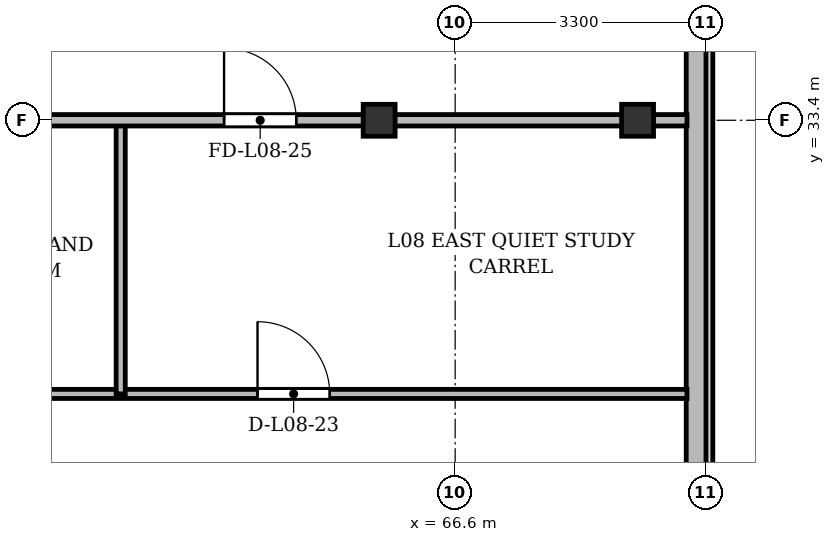
"""IFC4 building model, lengths in metres.
Left out: names, types, materials, properties, quantities, classifications, styles, units other than length and angle.
Written with IfcOpenShell. Run it as: python <this file> out.ifc"""

import sys

from ifc_helpers import new_model, si_unit, direction, frame, frame_2d, origin, origin_2d, place, context, subcontext, project, spatial, rectangle, i_section, extrude, source, transform, mapped, element, fill, save


model = new_model("IFC4")
c1 = context("Model", 3, precision=1e-05, world=origin(), true_north=direction((0.0, 1.0)))
c2 = subcontext(c1, "Body", "Model", "MODEL_VIEW")
j1 = project(units=[si_unit("LENGTHUNIT", "METRE"), si_unit("PLANEANGLEUNIT", "RADIAN")], contexts=[c1])
p1 = place(None, origin())
s1 = spatial("IfcSite", under=j1, at=p1, CompositionType="ELEMENT")
p2 = place(p1, origin())
s2 = spatial("IfcBuilding", under=s1, at=p2, CompositionType="ELEMENT")
p3 = place(p2, frame((0.0, 0.0, 34.3)))
s3 = spatial("IfcBuildingStorey", under=s2, at=p3, CompositionType="ELEMENT", Elevation=34.3)
m1 = source(origin(), c2, "Body", "SweptSolid", [
    extrude(i_section(OverallWidth=0.42, OverallDepth=0.42, WebThickness=0.026, FlangeThickness=0.04, at=origin_2d()), origin(), (0.0, 0.0, 1.0), 3.6),
])
for number, where, z_axis, x_axis in (
    (1, (65.6, 33.4, 0.0), (0.0, 0.0, 1.0), (1.0, 0.0, 0.0)),
    (2, (69.0, 33.4, 0.0), (0.0, 0.0, 1.0), (1.0, 0.0, 0.0)),
):
    element("IfcColumn", number, at=place(p3, frame(where, z_axis=z_axis, x_axis=x_axis)), inside=s3, PredefinedType="COLUMN", context=c2, shape_type="MappedRepresentation", body=[
        mapped(m1, transform((0.0, 0.0, 0.0), x_axis=(1.0, 0.0, 0.0), y_axis=(0.0, 1.0, 0.0), z_axis=(0.0, 0.0, 1.0), scale=1.0)),
    ])
p4 = place(p3, frame((69.77, 45.5, 0.0), z_axis=(0.0, 0.0, 1.0), x_axis=(0.0, -1.0, 0.0)))
e3 = element("IfcWall", 3, at=p4, inside=s3, PredefinedType="SOLIDWALL", context=c2, shape_type="SweptSolid", body=[
    extrude(rectangle(XDim=39.6, YDim=0.26, at=frame_2d((19.8, 0.0))), origin(), (0.0, 0.0, 1.0), 3.34),
])
p5 = place(p4, frame((36.95, 0.0, 0.92)))
e4 = element("IfcOpeningElement", 4, at=p5, cuts=e3, PredefinedType="OPENING", context=c2, shape_type="SweptSolid", body=[
    extrude(rectangle(XDim=1.2, YDim=1.65, at=frame_2d((0.6, 0.825))), frame((0.0, 0.14, 0.0), z_axis=(0.0, -1.0, 0.0), x_axis=(1.0, 0.0, 0.0)), (0.0, 0.0, 1.0), 0.28),
])
p6 = place(p4, frame((32.8, 0.0, 0.92)))
e5 = element("IfcOpeningElement", 5, at=p6, cuts=e3, PredefinedType="OPENING", context=c2, shape_type="SweptSolid", body=[
    extrude(rectangle(XDim=2.6, YDim=1.9, at=frame_2d((1.3, 0.95))), frame((0.0, 0.14, 0.0), z_axis=(0.0, -1.0, 0.0), x_axis=(1.0, 0.0, 0.0)), (0.0, 0.0, 1.0), 0.28),
])
p7 = place(p4, frame((28.6, 0.0, 0.92)))
e6 = element("IfcOpeningElement", 6, at=p7, cuts=e3, PredefinedType="OPENING", context=c2, shape_type="SweptSolid", body=[
    extrude(rectangle(XDim=2.6, YDim=1.9, at=frame_2d((1.3, 0.95))), frame((0.0, 0.14, 0.0), z_axis=(0.0, -1.0, 0.0), x_axis=(1.0, 0.0, 0.0)), (0.0, 0.0, 1.0), 0.28),
])
p8 = place(p4, frame((7.4, 0.0, 0.92)))
e7 = element("IfcOpeningElement", 7, at=p8, cuts=e3, PredefinedType="OPENING", context=c2, shape_type="SweptSolid", body=[
    extrude(rectangle(XDim=2.6, YDim=1.9, at=frame_2d((1.3, 0.95))), frame((0.0, 0.14, 0.0), z_axis=(0.0, -1.0, 0.0), x_axis=(1.0, 0.0, 0.0)), (0.0, 0.0, 1.0), 0.28),
])
p9 = place(p4, frame((4.5, 0.0, 0.92)))
e8 = element("IfcOpeningElement", 8, at=p9, cuts=e3, PredefinedType="OPENING", context=c2, shape_type="SweptSolid", body=[
    extrude(rectangle(XDim=1.2, YDim=1.65, at=frame_2d((0.6, 0.825))), frame((0.0, 0.14, 0.0), z_axis=(0.0, -1.0, 0.0), x_axis=(1.0, 0.0, 0.0)), (0.0, 0.0, 1.0), 0.28),
])
p10 = place(p4, frame((1.15, 0.0, 0.92)))
e9 = element("IfcOpeningElement", 9, at=p10, cuts=e3, PredefinedType="OPENING", context=c2, shape_type="SweptSolid", body=[
    extrude(rectangle(XDim=1.2, YDim=1.65, at=frame_2d((0.6, 0.825))), frame((0.0, 0.14, 0.0), z_axis=(0.0, -1.0, 0.0), x_axis=(1.0, 0.0, 0.0)), (0.0, 0.0, 1.0), 0.28),
])
p11 = place(p3, frame((54.8, 29.8, 0.0), z_axis=(0.0, 0.0, 1.0), x_axis=(1.0, 0.0, 0.0)))
e10 = element("IfcWall", 10, at=p11, inside=s3, PredefinedType="PARTITIONING", context=c2, shape_type="SweptSolid", body=[
    extrude(rectangle(XDim=14.85, YDim=0.12, at=frame_2d((7.425, 0.0))), origin(), (0.0, 0.0, 1.0), 2.752),
])
p12 = place(p11, frame((2.5, 0.0, 0.0)))
e11 = element("IfcOpeningElement", 11, at=p12, cuts=e10, PredefinedType="OPENING", context=c2, shape_type="SweptSolid", body=[
    extrude(rectangle(XDim=0.95, YDim=2.15, at=frame_2d((0.475, 1.075))), frame((0.0, 0.07, 0.0), z_axis=(0.0, -1.0, 0.0), x_axis=(1.0, 0.0, 0.0)), (0.0, 0.0, 1.0), 0.14),
])
p13 = place(p11, frame((9.2, 0.0, 0.0)))
e12 = element("IfcOpeningElement", 12, at=p13, cuts=e10, PredefinedType="OPENING", context=c2, shape_type="SweptSolid", body=[
    extrude(rectangle(XDim=0.95, YDim=2.15, at=frame_2d((0.475, 1.075))), frame((0.0, 0.07, 0.0), z_axis=(0.0, -1.0, 0.0), x_axis=(1.0, 0.0, 0.0)), (0.0, 0.0, 1.0), 0.14),
])
p14 = place(p3, frame((62.2, 29.8, 0.0), z_axis=(0.0, 0.0, 1.0), x_axis=(0.0, 1.0, 0.0)))
e13 = element("IfcWall", 13, at=p14, inside=s3, PredefinedType="PARTITIONING", context=c2, shape_type="SweptSolid", body=[
    extrude(rectangle(XDim=3.6, YDim=0.12, at=frame_2d((1.8, 0.0))), origin(), (0.0, 0.0, 1.0), 2.69),
])
p15 = place(p3, frame((58.8, 33.4, 0.0), z_axis=(0.0, 0.0, 1.0), x_axis=(1.0, 0.0, 0.0)))
e14 = element("IfcWall", 14, at=p15, inside=s3, PredefinedType="PARTITIONING", context=c2, shape_type="SweptSolid", body=[
    extrude(rectangle(XDim=10.85, YDim=0.15, at=frame_2d((5.425, 0.0))), origin(), (0.0, 0.0, 1.0), 2.69),
])
p16 = place(p15, frame((4.76, 0.0, 0.0)))
e15 = element("IfcOpeningElement", 15, at=p16, cuts=e14, PredefinedType="OPENING", context=c2, shape_type="SweptSolid", body=[
    extrude(rectangle(XDim=0.95, YDim=2.15, at=frame_2d((0.475, 1.075))), frame((0.0, 0.085, 0.0), z_axis=(0.0, -1.0, 0.0), x_axis=(1.0, 0.0, 0.0)), (0.0, 0.0, 1.0), 0.17),
])
m2 = source(origin(), c2, "Body", "SweptSolid", [
    extrude(rectangle(XDim=0.95, YDim=2.15, at=frame_2d((0.475, 1.075))), frame((0.0, 0.025, 0.0), z_axis=(0.0, -1.0, 0.0), x_axis=(1.0, 0.0, 0.0)), (0.0, 0.0, 1.0), 0.05),
])
p17 = place(p13, origin())
e16 = element("IfcDoor", 16, at=p17, inside=s3, OperationType="SINGLE_SWING_LEFT", PredefinedType="DOOR", context=c2, shape_type="MappedRepresentation", body=[
    mapped(m2, transform((0.0, 0.0, 0.0), x_axis=(1.0, 0.0, 0.0), y_axis=(0.0, 1.0, 0.0), z_axis=(0.0, 0.0, 1.0), scale=1.0)),
])
fill(e12, e16)
p18 = place(p16, origin())
e17 = element("IfcDoor", 17, at=p18, inside=s3, OperationType="SINGLE_SWING_LEFT", PredefinedType="DOOR", context=c2, shape_type="MappedRepresentation", body=[
    mapped(m2, transform((0.0, 0.0, 0.0), x_axis=(1.0, 0.0, 0.0), y_axis=(0.0, 1.0, 0.0), z_axis=(0.0, 0.0, 1.0), scale=1.0)),
])
fill(e15, e17)
save(model, sys.argv[1])
